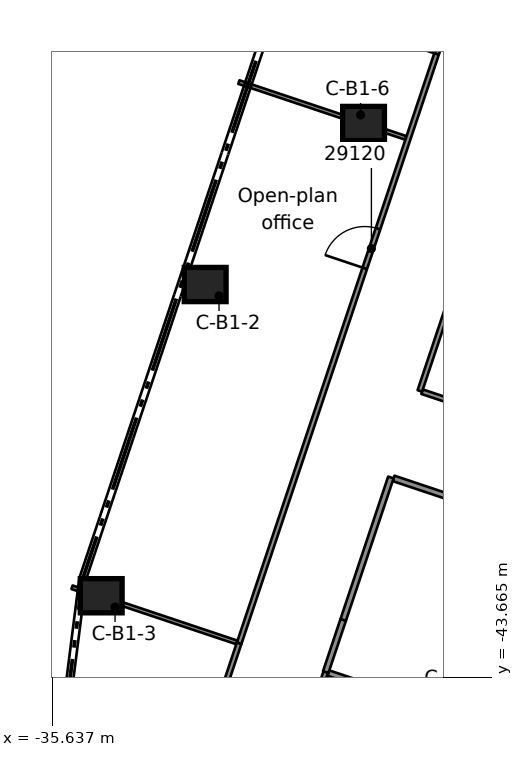
"""IFC4 building model, lengths in metres.
Left out: names, types, materials, properties, quantities, classifications, styles, units other than length and angle.
Written with IfcOpenShell. Run it as: python <this file> out.ifc"""

import sys

from ifc_helpers import new_model, si_unit, direction, frame, frame_2d, origin, origin_2d, place, context, subcontext, project, spatial, rectangle, extrude, element, fill, save


model = new_model("IFC4")
c1 = context("Model", 3, precision=1e-05, world=origin(), true_north=direction((0.0, 1.0)))
c2 = subcontext(c1, "Body", "Model", "MODEL_VIEW")
j1 = project(units=[si_unit("LENGTHUNIT", "METRE"), si_unit("PLANEANGLEUNIT", "RADIAN")], contexts=[c1])
p1 = place(None, origin())
s1 = spatial("IfcSite", under=j1, at=p1, CompositionType="ELEMENT")
p2 = place(p1, origin())
s2 = spatial("IfcBuilding", under=s1, at=p2, CompositionType="ELEMENT")
p3 = place(p2, frame((0.0, 0.0, 149.1)))
s3 = spatial("IfcBuildingStorey", under=s2, at=p3, CompositionType="ELEMENT", Elevation=149.1)
for number, where, z_axis, x_axis in (
    (1, (-31.608, -33.326, 0.0), (0.0, 0.0, 1.0), (1.0, 0.0, 0.0)),
    (2, (-34.344, -41.515, 0.0), (0.0, 0.0, 1.0), (1.0, 0.0, 0.0)),
    (3, (-27.441, -29.089, 0.0), (0.0, 0.0, 1.0), (1.0, 0.0, 0.0)),
):
    element("IfcColumn", number, at=place(p3, frame(where, z_axis=z_axis, x_axis=x_axis)), inside=s3, PredefinedType="COLUMN", context=c2, shape_type="SweptSolid", body=[
        extrude(rectangle(XDim=1.1, YDim=0.9, at=origin_2d()), origin(), (0.0, 0.0, 1.0), 3.5),
    ])
p4 = place(p3, frame((-35.112, -41.292, 0.0), z_axis=(0.0, 0.0, 1.0), x_axis=(0.94831984375, -0.317316047419, 0.0)))
e4 = element("IfcWall", 4, at=p4, inside=s3, PredefinedType="PARTITIONING", context=c2, shape_type="SweptSolid", body=[
    extrude(rectangle(XDim=4.576, YDim=0.1, at=frame_2d((2.288, 0.0))), origin(), (0.0, 0.0, 1.0), 3.08),
])
p5 = place(p3, frame((-28.366, -43.55, 0.0), z_axis=(0.0, 0.0, 1.0), x_axis=(0.948327152728, -0.317294203223, 0.0)))
e5 = element("IfcWall", 5, at=p5, inside=s3, PredefinedType="PARTITIONING", context=c2, shape_type="SweptSolid", body=[
    extrude(rectangle(XDim=26.162, YDim=0.15, at=frame_2d((13.081, 0.0))), origin(), (0.0, 0.0, 1.0), 3.08),
])
p6 = place(p3, frame((-1.841, -46.728, 0.0), z_axis=(0.0, 0.0, 1.0), x_axis=(-0.94832621322, 0.317297011205, 0.0)))
e6 = element("IfcWall", 6, at=p6, inside=s3, PredefinedType="PARTITIONING", context=c2, shape_type="SweptSolid", body=[
    extrude(rectangle(XDim=26.162, YDim=0.15, at=frame_2d((13.081, 0.0))), origin(), (0.0, 0.0, 1.0), 3.08),
])
p7 = place(p6, frame((12.525, 0.0, 0.0)))
e7 = element("IfcOpeningElement", 7, at=p7, cuts=e6, PredefinedType="OPENING", context=c2, shape_type="SweptSolid", body=[
    extrude(rectangle(XDim=0.9, YDim=2.1, at=frame_2d((0.45, 1.05))), frame((0.0, 0.085, 0.0), z_axis=(0.0, -1.0, 0.0), x_axis=(1.0, 0.0, 0.0)), (0.0, 0.0, 1.0), 0.17),
])
p8 = place(p3, frame((-25.901, -36.146, 0.0), z_axis=(0.0, 0.0, 1.0), x_axis=(0.948326561211, -0.317295971139, 0.0)))
e8 = element("IfcWall", 8, at=p8, inside=s3, PredefinedType="PARTITIONING", context=c2, shape_type="SweptSolid", body=[
    extrude(rectangle(XDim=26.187, YDim=0.125, at=frame_2d((13.094, 0.0))), origin(), (0.0, 0.0, 1.0), 3.08),
])
p9 = place(p3, frame((-30.722, -27.999, 0.0), z_axis=(0.0, 0.0, 1.0), x_axis=(0.948355935611, -0.317208164132, 0.0)))
e9 = element("IfcWall", 9, at=p9, inside=s3, PredefinedType="PARTITIONING", context=c2, shape_type="SweptSolid", body=[
    extrude(rectangle(XDim=4.631, YDim=0.1, at=frame_2d((2.315, 0.0))), origin(), (0.0, 0.0, 1.0), 3.08),
])
p10 = place(p3, frame((-28.437, -43.526, 0.0), z_axis=(0.0, 0.0, 1.0), x_axis=(0.317640646832, 0.94821116819, 0.0)))
e10 = element("IfcWall", 10, at=p10, inside=s3, PredefinedType="PARTITIONING", context=c2, shape_type="SweptSolid", body=[
    extrude(rectangle(XDim=1.451, YDim=0.15, at=frame_2d((0.726, 0.0))), origin(), (0.0, 0.0, 1.0), 3.08),
])
p11 = place(p3, frame((-27.976, -42.15, 0.0), z_axis=(0.0, 0.0, 1.0), x_axis=(0.317413881712, 0.948287101935, 0.0)))
e11 = element("IfcWall", 11, at=p11, inside=s3, PredefinedType="PARTITIONING", context=c2, shape_type="SweptSolid", body=[
    extrude(rectangle(XDim=3.951, YDim=0.15, at=frame_2d((1.976, 0.0))), origin(), (0.0, 0.0, 1.0), 3.08),
])
p12 = place(p3, frame((-22.308, -25.211, 0.0), z_axis=(0.0, 0.0, 1.0), x_axis=(-0.317283910316, -0.948330596498, 0.0)))
e12 = element("IfcWall", 12, at=p12, inside=s3, PredefinedType="PARTITIONING", context=c2, shape_type="SweptSolid", body=[
    extrude(rectangle(XDim=11.51, YDim=0.125, at=frame_2d((5.755, 0.0))), origin(), (0.0, 0.0, 1.0), 3.08),
])
p13 = place(p12, frame((2.1, 0.0, 0.0)))
e13 = element("IfcOpeningElement", 13, at=p13, cuts=e12, PredefinedType="OPENING", context=c2, shape_type="SweptSolid", body=[
    extrude(rectangle(XDim=0.9, YDim=2.1, at=frame_2d((0.45, 1.05))), frame((0.0, 0.073, 0.0), z_axis=(0.0, -1.0, 0.0), x_axis=(1.0, 0.0, 0.0)), (0.0, 0.0, 1.0), 0.145),
])
p14 = place(p12, frame((7.914, 0.0, 0.0)))
e14 = element("IfcOpeningElement", 14, at=p14, cuts=e12, PredefinedType="OPENING", context=c2, shape_type="SweptSolid", body=[
    extrude(rectangle(XDim=0.9, YDim=2.1, at=frame_2d((0.45, 1.05))), frame((0.0, 0.073, 0.0), z_axis=(0.0, -1.0, 0.0), x_axis=(1.0, 0.0, 0.0)), (0.0, 0.0, 1.0), 0.145),
])
p15 = place(p3, frame((-29.23, -45.897, 0.0), z_axis=(0.0, 0.0, 1.0), x_axis=(0.317165045262, 0.948370357015, 0.0)))
e15 = element("IfcWall", 15, at=p15, inside=s3, PredefinedType="PARTITIONING", context=c2, shape_type="SweptSolid", body=[
    extrude(rectangle(XDim=2.5, YDim=0.125, at=frame_2d((1.25, 0.0))), origin(), (0.0, 0.0, 1.0), 3.08),
])
p16 = place(p3, frame((-30.714, -42.764, 0.0), z_axis=(0.0, 0.0, 1.0), x_axis=(0.317699123241, 0.94819157721, 0.0)))
e16 = element("IfcWall", 16, at=p16, inside=s3, PredefinedType="PARTITIONING", context=c2, shape_type="SweptSolid", body=[
    extrude(rectangle(XDim=19.906, YDim=0.125, at=frame_2d((9.953, 0.0))), origin(), (0.0, 0.0, 1.0), 3.08),
])
p17 = place(p16, frame((16.35, 0.0, 0.0)))
e17 = element("IfcOpeningElement", 17, at=p17, cuts=e16, PredefinedType="OPENING", context=c2, shape_type="SweptSolid", body=[
    extrude(rectangle(XDim=1.0, YDim=2.1, at=frame_2d((0.5, 1.05))), frame((0.0, 0.073, 0.0), z_axis=(0.0, -1.0, 0.0), x_axis=(1.0, 0.0, 0.0)), (0.0, 0.0, 1.0), 0.145),
])
p18 = place(p16, frame((10.403, 0.0, 0.0)))
e18 = element("IfcOpeningElement", 18, at=p18, cuts=e16, PredefinedType="OPENING", context=c2, shape_type="SweptSolid", body=[
    extrude(rectangle(XDim=1.1, YDim=2.1, at=frame_2d((0.55, 1.05))), frame((0.0, 0.073, 0.0), z_axis=(0.0, -1.0, 0.0), x_axis=(1.0, 0.0, 0.0)), (0.0, 0.0, 1.0), 0.145),
])
p19 = place(p3, frame((-30.715, -42.765, 0.0), z_axis=(0.0, 0.0, 1.0), x_axis=(-0.31696020199, -0.948438838489, 0.0)))
e19 = element("IfcWall", 19, at=p19, inside=s3, PredefinedType="PARTITIONING", context=c2, shape_type="SweptSolid", body=[
    extrude(rectangle(XDim=5.199, YDim=0.125, at=frame_2d((2.6, 0.0))), origin(), (0.0, 0.0, 1.0), 3.08),
])
p20 = place(p17, origin())
e20 = element("IfcDoor", 20, at=p20, inside=s3, OperationType="SINGLE_SWING_RIGHT", PredefinedType="DOOR", context=c2, shape_type="SweptSolid", body=[
    extrude(rectangle(XDim=1.0, YDim=2.1, at=frame_2d((0.5, 1.05))), frame((0.0, 0.025, 0.0), z_axis=(0.0, -1.0, 0.0), x_axis=(1.0, 0.0, 0.0)), (0.0, 0.0, 1.0), 0.05),
])
fill(e17, e20)
p21 = place(p18, origin())
e21 = element("IfcDoor", 21, at=p21, inside=s3, OperationType="SINGLE_SWING_RIGHT", PredefinedType="DOOR", context=c2, shape_type="SweptSolid", body=[
    extrude(rectangle(XDim=1.1, YDim=2.1, at=frame_2d((0.55, 1.05))), frame((0.0, 0.025, 0.0), z_axis=(0.0, -1.0, 0.0), x_axis=(1.0, 0.0, 0.0)), (0.0, 0.0, 1.0), 0.05),
])
fill(e18, e21)
save(model, sys.argv[1])
